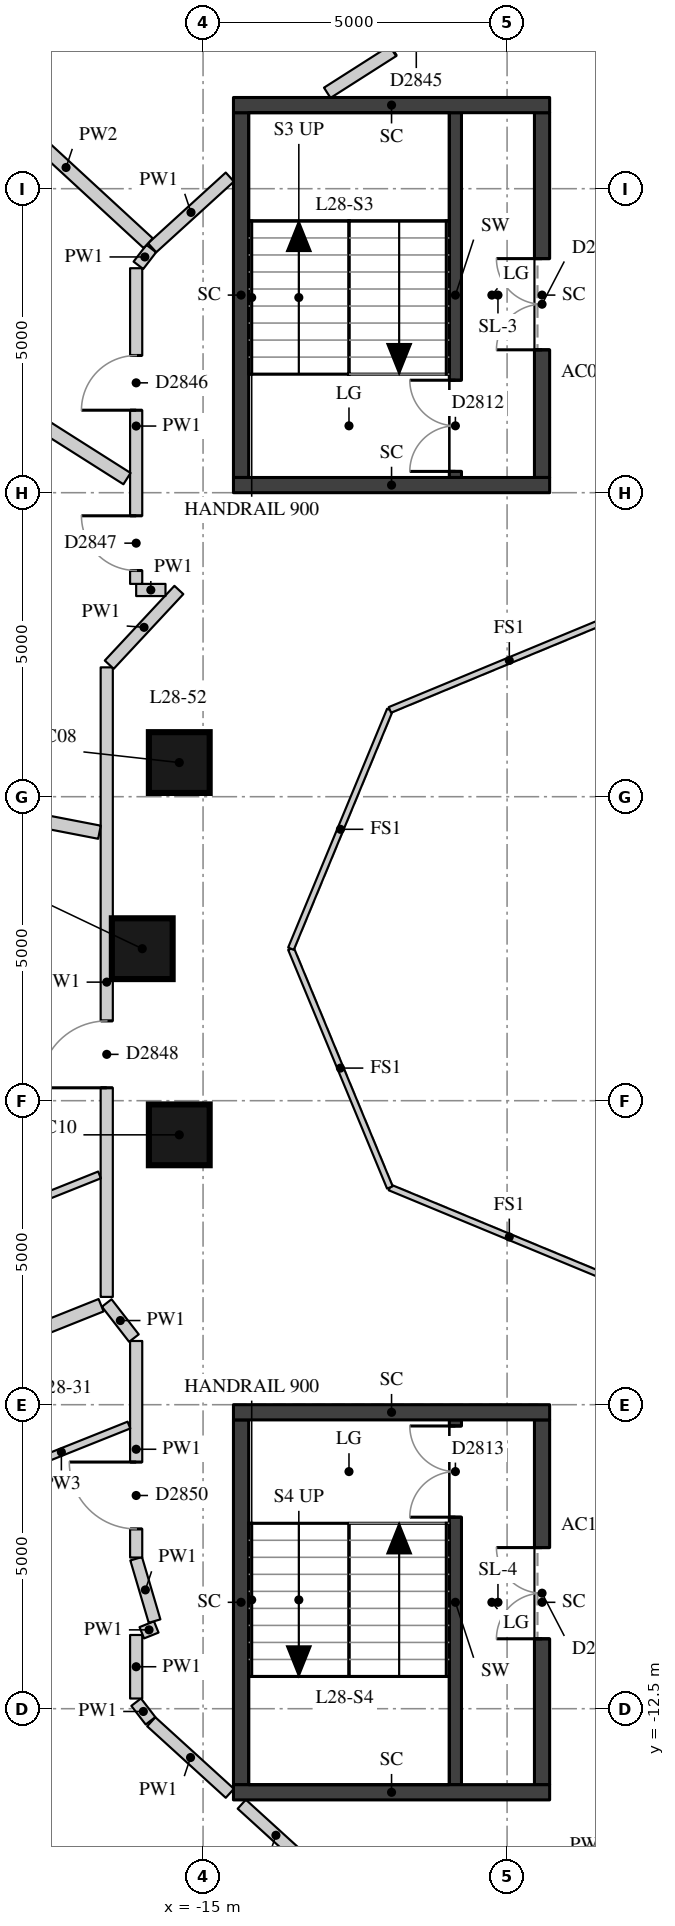
"""IFC4 building model, lengths in metres.
Left out: names, types, materials, properties, quantities, classifications, styles, units other than length and angle.
Written with IfcOpenShell. Run it as: python <this file> out.ifc"""

import sys

from ifc_helpers import new_model, si_unit, direction, frame, frame_2d, origin, origin_2d, place, context, subcontext, project, spatial, rectangle, extrude, element, fill, save


model = new_model("IFC4")
c1 = context("Model", 3, precision=1e-05, world=origin(), true_north=direction((0.0, 1.0)))
c2 = subcontext(c1, "Body", "Model", "MODEL_VIEW")
j1 = project(units=[si_unit("LENGTHUNIT", "METRE"), si_unit("PLANEANGLEUNIT", "RADIAN")], contexts=[c1])
p1 = place(None, origin())
s1 = spatial("IfcSite", under=j1, at=p1, CompositionType="ELEMENT")
p2 = place(p1, origin())
s2 = spatial("IfcBuilding", under=s1, at=p2, CompositionType="ELEMENT")
p3 = place(p2, frame((0.0, 0.0, 102.1)))
s3 = spatial("IfcBuildingStorey", under=s2, at=p3, CompositionType="ELEMENT", Elevation=102.1)
for number, where, z_axis, x_axis in (
    (1, (-15.391, 3.062, 0.0), (0.0, 0.0, 1.0), (1.0, 0.0, 0.0)),
    (2, (-16.0, 0.0, 0.0), (0.0, 0.0, 1.0), (1.0, 0.0, 0.0)),
    (3, (-15.391, -3.062, 0.0), (0.0, 0.0, 1.0), (1.0, 0.0, 0.0)),
):
    element("IfcColumn", number, at=place(p3, frame(where, z_axis=z_axis, x_axis=x_axis)), inside=s3, PredefinedType="COLUMN", context=c2, shape_type="SweptSolid", body=[
        extrude(rectangle(XDim=1.0, YDim=1.0, at=origin_2d()), origin(), (0.0, 0.0, 1.0), 3.3),
    ])
p4 = place(p3, frame((-10.85, 7.75, 0.0), z_axis=(0.0, 0.0, 1.0), x_axis=(0.0, 1.0, 0.0)))
e4 = element("IfcWall", 4, at=p4, inside=s3, PredefinedType="SHEAR", context=c2, shape_type="SweptSolid", body=[
    extrude(rectangle(XDim=6.0, YDim=0.2, at=frame_2d((3.0, 0.0))), origin(), (0.0, 0.0, 1.0), 3.02),
])
p5 = place(p4, frame((0.1, 0.0, 0.0)))
e5 = element("IfcOpeningElement", 5, at=p5, cuts=e4, PredefinedType="OPENING", context=c2, shape_type="SweptSolid", body=[
    extrude(rectangle(XDim=1.5, YDim=2.1, at=frame_2d((0.75, 1.05))), frame((0.0, 0.11, 0.0), z_axis=(0.0, -1.0, 0.0), x_axis=(1.0, 0.0, 0.0)), (0.0, 0.0, 1.0), 0.22),
])
p6 = place(p3, frame((-10.85, -13.75, 0.0), z_axis=(0.0, 0.0, 1.0), x_axis=(0.0, 1.0, 0.0)))
e6 = element("IfcWall", 6, at=p6, inside=s3, PredefinedType="SHEAR", context=c2, shape_type="SweptSolid", body=[
    extrude(rectangle(XDim=6.0, YDim=0.2, at=frame_2d((3.0, 0.0))), origin(), (0.0, 0.0, 1.0), 3.02),
])
p7 = place(p6, frame((4.4, 0.0, 0.0)))
e7 = element("IfcOpeningElement", 7, at=p7, cuts=e6, PredefinedType="OPENING", context=c2, shape_type="SweptSolid", body=[
    extrude(rectangle(XDim=1.5, YDim=2.1, at=frame_2d((0.75, 1.05))), frame((0.0, 0.11, 0.0), z_axis=(0.0, -1.0, 0.0), x_axis=(1.0, 0.0, 0.0)), (0.0, 0.0, 1.0), 0.22),
])
p8 = place(p3, frame((-14.375, 7.75, -0.28), z_axis=(0.0, 0.0, 1.0), x_axis=(0.0, 1.0, 0.0)))
e8 = element("IfcWall", 8, at=p8, inside=s3, PredefinedType="SHEAR", context=c2, shape_type="SweptSolid", body=[
    extrude(rectangle(XDim=6.0, YDim=0.25, at=frame_2d((3.0, 0.0))), origin(), (0.0, 0.0, 1.0), 3.3),
])
p9 = place(p3, frame((-9.425, 7.75, -0.28), z_axis=(0.0, 0.0, 1.0), x_axis=(0.0, 1.0, 0.0)))
e9 = element("IfcWall", 9, at=p9, inside=s3, PredefinedType="SHEAR", context=c2, shape_type="SweptSolid", body=[
    extrude(rectangle(XDim=6.0, YDim=0.25, at=frame_2d((3.0, 0.0))), origin(), (0.0, 0.0, 1.0), 3.3),
])
p10 = place(p9, frame((2.1, 0.0, 0.28)))
e10 = element("IfcOpeningElement", 10, at=p10, cuts=e9, PredefinedType="OPENING", context=c2, shape_type="SweptSolid", body=[
    extrude(rectangle(XDim=1.5, YDim=2.1, at=frame_2d((0.75, 1.05))), frame((0.0, 0.135, 0.0), z_axis=(0.0, -1.0, 0.0), x_axis=(1.0, 0.0, 0.0)), (0.0, 0.0, 1.0), 0.27),
])
for number, where, z_axis, x_axis in (
    (11, (-14.5, 13.875, -0.28), (0.0, 0.0, 1.0), (1.0, 0.0, 0.0)),
    (12, (-14.5, 7.625, -0.28), (0.0, 0.0, 1.0), (1.0, 0.0, 0.0)),
):
    element("IfcWall", number, at=place(p3, frame(where, z_axis=z_axis, x_axis=x_axis)), inside=s3, PredefinedType="SHEAR", context=c2, shape_type="SweptSolid", body=[
        extrude(rectangle(XDim=5.2, YDim=0.25, at=frame_2d((2.6, 0.0))), origin(), (0.0, 0.0, 1.0), 3.3),
    ])
p11 = place(p3, frame((-14.375, -13.75, -0.28), z_axis=(0.0, 0.0, 1.0), x_axis=(0.0, 1.0, 0.0)))
e13 = element("IfcWall", 13, at=p11, inside=s3, PredefinedType="SHEAR", context=c2, shape_type="SweptSolid", body=[
    extrude(rectangle(XDim=6.0, YDim=0.25, at=frame_2d((3.0, 0.0))), origin(), (0.0, 0.0, 1.0), 3.3),
])
p12 = place(p3, frame((-9.425, -13.75, -0.28), z_axis=(0.0, 0.0, 1.0), x_axis=(0.0, 1.0, 0.0)))
e14 = element("IfcWall", 14, at=p12, inside=s3, PredefinedType="SHEAR", context=c2, shape_type="SweptSolid", body=[
    extrude(rectangle(XDim=6.0, YDim=0.25, at=frame_2d((3.0, 0.0))), origin(), (0.0, 0.0, 1.0), 3.3),
])
p13 = place(p12, frame((2.4, 0.0, 0.28)))
e15 = element("IfcOpeningElement", 15, at=p13, cuts=e14, PredefinedType="OPENING", context=c2, shape_type="SweptSolid", body=[
    extrude(rectangle(XDim=1.5, YDim=2.1, at=frame_2d((0.75, 1.05))), frame((0.0, 0.135, 0.0), z_axis=(0.0, -1.0, 0.0), x_axis=(1.0, 0.0, 0.0)), (0.0, 0.0, 1.0), 0.27),
])
for number, where, z_axis, x_axis in (
    (16, (-14.5, -7.625, -0.28), (0.0, 0.0, 1.0), (1.0, 0.0, 0.0)),
    (17, (-14.5, -13.875, -0.28), (0.0, 0.0, 1.0), (1.0, 0.0, 0.0)),
):
    element("IfcWall", number, at=place(p3, frame(where, z_axis=z_axis, x_axis=x_axis)), inside=s3, PredefinedType="SHEAR", context=c2, shape_type="SweptSolid", body=[
        extrude(rectangle(XDim=5.2, YDim=0.25, at=frame_2d((2.6, 0.0))), origin(), (0.0, 0.0, 1.0), 3.3),
    ])
p14 = place(p3, frame((-14.56, -13.891, 0.0), z_axis=(0.0, 0.0, 1.0), x_axis=(-0.739440483737, 0.673221932954, 0.0)))
e18 = element("IfcWall", 18, at=p14, inside=s3, PredefinedType="PARTITIONING", context=c2, shape_type="SweptSolid", body=[
    extrude(rectangle(XDim=1.748, YDim=0.2, at=frame_2d((0.874, 0.0))), origin(), (0.0, 0.0, 1.0), 3.02),
])
p15 = place(p3, frame((-15.864, -12.699, 0.0), z_axis=(0.0, 0.0, 1.0), x_axis=(-0.61004607296, 0.792365943782, 0.0)))
e19 = element("IfcWall", 19, at=p15, inside=s3, PredefinedType="PARTITIONING", context=c2, shape_type="SweptSolid", body=[
    extrude(rectangle(XDim=0.387, YDim=0.2, at=frame_2d((0.193, 0.0))), origin(), (0.0, 0.0, 1.0), 3.02),
])
p16 = place(p3, frame((-16.1, -12.332, 0.0), z_axis=(0.0, 0.0, 1.0), x_axis=(0.0, 1.0, 0.0)))
e20 = element("IfcWall", 20, at=p16, inside=s3, PredefinedType="PARTITIONING", context=c2, shape_type="SweptSolid", body=[
    extrude(rectangle(XDim=1.045, YDim=0.2, at=frame_2d((0.522, 0.0))), origin(), (0.0, 0.0, 1.0), 3.02),
])
p17 = place(p3, frame((-16.007, -11.251, 0.0), z_axis=(0.0, 0.0, 1.0), x_axis=(0.928016011931, 0.372540308691, 0.0)))
e21 = element("IfcWall", 21, at=p17, inside=s3, PredefinedType="PARTITIONING", context=c2, shape_type="SweptSolid", body=[
    extrude(rectangle(XDim=0.256, YDim=0.2, at=frame_2d((0.128, 0.0))), origin(), (0.0, 0.0, 1.0), 3.02),
])
p18 = place(p3, frame((-15.798, -11.059, 0.0), z_axis=(0.0, 0.0, 1.0), x_axis=(-0.282883185669, 0.959154368841, 0.0)))
e22 = element("IfcWall", 22, at=p18, inside=s3, PredefinedType="PARTITIONING", context=c2, shape_type="SweptSolid", body=[
    extrude(rectangle(XDim=1.069, YDim=0.2, at=frame_2d((0.535, 0.0))), origin(), (0.0, 0.0, 1.0), 3.02),
])
p19 = place(p3, frame((-16.1, -10.013, 0.0), z_axis=(0.0, 0.0, 1.0), x_axis=(0.0, 1.0, 0.0)))
e23 = element("IfcWall", 23, at=p19, inside=s3, PredefinedType="PARTITIONING", context=c2, shape_type="SweptSolid", body=[
    extrude(rectangle(XDim=3.561, YDim=0.2, at=frame_2d((1.781, 0.0))), origin(), (0.0, 0.0, 1.0), 3.02),
])
p20 = place(p19, frame((0.47, 0.0, 0.0)))
e24 = element("IfcOpeningElement", 24, at=p20, cuts=e23, PredefinedType="OPENING", context=c2, shape_type="SweptSolid", body=[
    extrude(rectangle(XDim=1.1, YDim=2.1, at=frame_2d((0.55, 1.05))), frame((0.0, 0.11, 0.0), z_axis=(0.0, -1.0, 0.0), x_axis=(1.0, 0.0, 0.0)), (0.0, 0.0, 1.0), 0.22),
])
p21 = place(p3, frame((-16.137, -6.405, 0.0), z_axis=(0.0, 0.0, 1.0), x_axis=(-0.612388914667, 0.790556650211, 0.0)))
e25 = element("IfcWall", 25, at=p21, inside=s3, PredefinedType="PARTITIONING", context=c2, shape_type="SweptSolid", body=[
    extrude(rectangle(XDim=0.73, YDim=0.2, at=frame_2d((0.365, 0.0))), origin(), (0.0, 0.0, 1.0), 3.02),
])
p22 = place(p3, frame((-16.584, -5.727, 0.0), z_axis=(0.0, 0.0, 1.0), x_axis=(0.0, 1.0, 0.0)))
e26 = element("IfcWall", 26, at=p22, inside=s3, PredefinedType="PARTITIONING", context=c2, shape_type="SweptSolid", body=[
    extrude(rectangle(XDim=10.354, YDim=0.2, at=frame_2d((5.177, 0.0))), origin(), (0.0, 0.0, 1.0), 3.02),
])
p23 = place(p22, frame((3.439, 0.0, 0.0)))
e27 = element("IfcOpeningElement", 27, at=p23, cuts=e26, PredefinedType="OPENING", context=c2, shape_type="SweptSolid", body=[
    extrude(rectangle(XDim=1.1, YDim=2.1, at=frame_2d((0.55, 1.05))), frame((0.0, 0.11, 0.0), z_axis=(0.0, -1.0, 0.0), x_axis=(1.0, 0.0, 0.0)), (0.0, 0.0, 1.0), 0.22),
])
p24 = place(p3, frame((-16.543, 4.671, 0.0), z_axis=(0.0, 0.0, 1.0), x_axis=(0.681815766934, 0.731523929861, 0.0)))
e28 = element("IfcWall", 28, at=p24, inside=s3, PredefinedType="PARTITIONING", context=c2, shape_type="SweptSolid", body=[
    extrude(rectangle(XDim=1.68, YDim=0.2, at=frame_2d((0.84, 0.0))), origin(), (0.0, 0.0, 1.0), 3.02),
])
p25 = place(p3, frame((-15.618, 5.9, 0.0), z_axis=(0.0, 0.0, 1.0), x_axis=(-1.0, 0.0, 0.0)))
e29 = element("IfcWall", 29, at=p25, inside=s3, PredefinedType="PARTITIONING", context=c2, shape_type="SweptSolid", body=[
    extrude(rectangle(XDim=0.482, YDim=0.2, at=frame_2d((0.241, 0.0))), origin(), (0.0, 0.0, 1.0), 3.02),
])
p26 = place(p3, frame((-16.1, 6.0, 0.0), z_axis=(0.0, 0.0, 1.0), x_axis=(0.0, 1.0, 0.0)))
e30 = element("IfcWall", 30, at=p26, inside=s3, PredefinedType="PARTITIONING", context=c2, shape_type="SweptSolid", body=[
    extrude(rectangle(XDim=5.192, YDim=0.2, at=frame_2d((2.596, 0.0))), origin(), (0.0, 0.0, 1.0), 3.02),
])
p27 = place(p26, frame((2.857, 0.0, 0.0)))
e31 = element("IfcOpeningElement", 31, at=p27, cuts=e30, PredefinedType="OPENING", context=c2, shape_type="SweptSolid", body=[
    extrude(rectangle(XDim=0.9, YDim=2.1, at=frame_2d((0.45, 1.05))), frame((0.0, 0.11, 0.0), z_axis=(0.0, -1.0, 0.0), x_axis=(1.0, 0.0, 0.0)), (0.0, 0.0, 1.0), 0.22),
])
p28 = place(p26, frame((0.22, 0.0, 0.0)))
e32 = element("IfcOpeningElement", 32, at=p28, cuts=e30, PredefinedType="OPENING", context=c2, shape_type="SweptSolid", body=[
    extrude(rectangle(XDim=0.9, YDim=2.1, at=frame_2d((0.45, 1.05))), frame((0.0, 0.11, 0.0), z_axis=(0.0, -1.0, 0.0), x_axis=(1.0, 0.0, 0.0)), (0.0, 0.0, 1.0), 0.22),
])
p29 = place(p3, frame((-16.063, 11.24, 0.0), z_axis=(0.0, 0.0, 1.0), x_axis=(0.609744747854, 0.792597844096, 0.0)))
e33 = element("IfcWall", 33, at=p29, inside=s3, PredefinedType="PARTITIONING", context=c2, shape_type="SweptSolid", body=[
    extrude(rectangle(XDim=0.347, YDim=0.2, at=frame_2d((0.174, 0.0))), origin(), (0.0, 0.0, 1.0), 3.02),
])
p30 = place(p3, frame((-15.837, 11.528, 0.0), z_axis=(0.0, 0.0, 1.0), x_axis=(0.739402681643, 0.673263450946, 0.0)))
e34 = element("IfcWall", 34, at=p30, inside=s3, PredefinedType="PARTITIONING", context=c2, shape_type="SweptSolid", body=[
    extrude(rectangle(XDim=1.728, YDim=0.2, at=frame_2d((0.864, 0.0))), origin(), (0.0, 0.0, 1.0), 3.02),
])
p31 = place(p3, frame((-12.957, 14.077, 0.0), z_axis=(0.0, 0.0, 1.0), x_axis=(0.84319985174, 0.537600232538, 0.0)))
e35 = element("IfcWall", 35, at=p31, inside=s3, PredefinedType="PARTITIONING", context=c2, shape_type="SweptSolid", body=[
    extrude(rectangle(XDim=2.833, YDim=0.2, at=frame_2d((1.417, 0.0))), origin(), (0.0, 0.0, 1.0), 3.02),
])
p32 = place(p31, frame((1.286, 0.0, 0.0)))
e36 = element("IfcOpeningElement", 36, at=p32, cuts=e35, PredefinedType="OPENING", context=c2, shape_type="SweptSolid", body=[
    extrude(rectangle(XDim=0.9, YDim=2.1, at=frame_2d((0.45, 1.05))), frame((0.0, 0.11, 0.0), z_axis=(0.0, -1.0, 0.0), x_axis=(1.0, 0.0, 0.0)), (0.0, 0.0, 1.0), 0.22),
])
p33 = place(p3, frame((-13.24, -15.093, 0.0), z_axis=(0.0, 0.0, 1.0), x_axis=(-0.739438095557, 0.673224556028, 0.0)))
e37 = element("IfcWall", 37, at=p33, inside=s3, PredefinedType="PARTITIONING", context=c2, shape_type="SweptSolid", body=[
    extrude(rectangle(XDim=1.519, YDim=0.2, at=frame_2d((0.76, 0.0))), origin(), (0.0, 0.0, 1.0), 3.02),
])
p34 = place(p3, frame((-18.604, 14.094, 0.0), z_axis=(0.0, 0.0, 1.0), x_axis=(0.73529495628, -0.677747244383, 0.0)))
e38 = element("IfcWall", 38, at=p34, inside=s3, PredefinedType="PARTITIONING", context=c2, shape_type="SweptSolid", body=[
    extrude(rectangle(XDim=3.674, YDim=0.22, at=frame_2d((1.837, 0.0))), origin(), (0.0, 0.0, 1.0), 3.02),
])
p35 = place(p3, frame((-21.126, 10.823, 0.0), z_axis=(0.0, 0.0, 1.0), x_axis=(0.844518840625, -0.535525842355, 0.0)))
e39 = element("IfcWall", 39, at=p35, inside=s3, PredefinedType="PARTITIONING", context=c2, shape_type="SweptSolid", body=[
    extrude(rectangle(XDim=5.773, YDim=0.22, at=frame_2d((2.887, 0.0))), origin(), (0.0, 0.0, 1.0), 3.02),
])
p36 = place(p3, frame((-22.793, 3.095, 0.0), z_axis=(0.0, 0.0, 1.0), x_axis=(0.98175994641, -0.190124715976, 0.0)))
e40 = element("IfcWall", 40, at=p36, inside=s3, PredefinedType="PARTITIONING", context=c2, shape_type="SweptSolid", body=[
    extrude(rectangle(XDim=6.202, YDim=0.22, at=frame_2d((3.101, 0.0))), origin(), (0.0, 0.0, 1.0), 2.47),
])
p37 = place(p3, frame((-21.736, -7.887, 0.0), z_axis=(0.0, 0.0, 1.0), x_axis=(0.928513770625, 0.371297963583, 0.0)))
e41 = element("IfcWall", 41, at=p37, inside=s3, PredefinedType="PARTITIONING", context=c2, shape_type="SweptSolid", body=[
    extrude(rectangle(XDim=5.448, YDim=0.22, at=frame_2d((2.724, 0.0))), origin(), (0.0, 0.0, 1.0), 3.02),
])
p38 = place(p3, frame((-16.703, -3.721, 0.0), z_axis=(0.0, 0.0, 1.0), x_axis=(-0.928539725362, -0.371233051362, 0.0)))
e42 = element("IfcWall", 42, at=p38, inside=s3, PredefinedType="PARTITIONING", context=c2, shape_type="SweptSolid", body=[
    extrude(rectangle(XDim=3.472, YDim=0.12, at=frame_2d((1.736, 0.0))), origin(), (0.0, 0.0, 1.0), 3.02),
])
p39 = place(p3, frame((-16.219, -7.835, 0.0), z_axis=(0.0, 0.0, 1.0), x_axis=(-0.928532951542, -0.371249993806, 0.0)))
e43 = element("IfcWall", 43, at=p39, inside=s3, PredefinedType="PARTITIONING", context=c2, shape_type="SweptSolid", body=[
    extrude(rectangle(XDim=2.394, YDim=0.12, at=frame_2d((1.197, 0.0))), origin(), (0.0, 0.0, 1.0), 3.02),
])
p40 = place(p3, frame((-6.428, -14.352, 0.0), z_axis=(0.0, 0.0, 1.0), x_axis=(-0.46531034676, -0.885147604187, 0.0)))
e44 = element("IfcWall", 44, at=p40, inside=s3, PredefinedType="PARTITIONING", context=c2, shape_type="SweptSolid", body=[
    extrude(rectangle(XDim=5.261, YDim=0.12, at=frame_2d((2.631, 0.0))), origin(), (0.0, 0.0, 1.0), 3.02),
])
for number, where, z_axis, x_axis in (
    (45, (-8.0, -5.554, 0.0), (0.0, 0.0, 1.0), (-0.924, 0.383, 0.0)),
    (46, (-11.927, -3.927, 0.0), (0.0, 0.0, 1.0), (-0.383, 0.924, 0.0)),
    (47, (-13.554, 0.0, 0.0), (0.0, 0.0, 1.0), (0.383, 0.924, 0.0)),
    (48, (-11.927, 3.927, 0.0), (0.0, 0.0, 1.0), (0.924, 0.383, 0.0)),
):
    element("IfcWall", number, at=place(p3, frame(where, z_axis=z_axis, x_axis=x_axis)), inside=s3, PredefinedType="PARTITIONING", context=c2, shape_type="SweptSolid", body=[
        extrude(rectangle(XDim=4.251, YDim=0.1, at=frame_2d((2.125, 0.0))), origin(), (0.0, 0.0, 1.0), 3.02),
    ])
p41 = place(p5, origin())
e49 = element("IfcDoor", 49, at=p41, inside=s3, OperationType="DOUBLE_DOOR_SINGLE_SWING", PredefinedType="DOOR", context=c2, shape_type="SweptSolid", body=[
    extrude(rectangle(XDim=1.5, YDim=2.1, at=frame_2d((0.75, 1.05))), frame((0.0, 0.025, 0.0), z_axis=(0.0, -1.0, 0.0), x_axis=(1.0, 0.0, 0.0)), (0.0, 0.0, 1.0), 0.05),
])
fill(e5, e49)
p42 = place(p7, origin())
e50 = element("IfcDoor", 50, at=p42, inside=s3, OperationType="DOUBLE_DOOR_SINGLE_SWING", PredefinedType="DOOR", context=c2, shape_type="SweptSolid", body=[
    extrude(rectangle(XDim=1.5, YDim=2.1, at=frame_2d((0.75, 1.05))), frame((0.0, 0.025, 0.0), z_axis=(0.0, -1.0, 0.0), x_axis=(1.0, 0.0, 0.0)), (0.0, 0.0, 1.0), 0.05),
])
fill(e7, e50)
p43 = place(p10, origin())
e51 = element("IfcDoor", 51, at=p43, inside=s3, OperationType="DOUBLE_DOOR_SINGLE_SWING", PredefinedType="DOOR", context=c2, shape_type="SweptSolid", body=[
    extrude(rectangle(XDim=1.5, YDim=2.1, at=frame_2d((0.75, 1.05))), frame((0.0, 0.025, 0.0), z_axis=(0.0, -1.0, 0.0), x_axis=(1.0, 0.0, 0.0)), (0.0, 0.0, 1.0), 0.05),
])
fill(e10, e51)
p44 = place(p13, origin())
e52 = element("IfcDoor", 52, at=p44, inside=s3, OperationType="DOUBLE_DOOR_SINGLE_SWING", PredefinedType="DOOR", context=c2, shape_type="SweptSolid", body=[
    extrude(rectangle(XDim=1.5, YDim=2.1, at=frame_2d((0.75, 1.05))), frame((0.0, 0.025, 0.0), z_axis=(0.0, -1.0, 0.0), x_axis=(1.0, 0.0, 0.0)), (0.0, 0.0, 1.0), 0.05),
])
fill(e15, e52)
p45 = place(p32, origin())
e53 = element("IfcDoor", 53, at=p45, inside=s3, OperationType="SINGLE_SWING_RIGHT", PredefinedType="DOOR", context=c2, shape_type="SweptSolid", body=[
    extrude(rectangle(XDim=0.9, YDim=2.1, at=frame_2d((0.45, 1.05))), frame((0.0, 0.025, 0.0), z_axis=(0.0, -1.0, 0.0), x_axis=(1.0, 0.0, 0.0)), (0.0, 0.0, 1.0), 0.05),
])
fill(e36, e53)
p46 = place(p27, origin())
e54 = element("IfcDoor", 54, at=p46, inside=s3, OperationType="SINGLE_SWING_LEFT", PredefinedType="DOOR", context=c2, shape_type="SweptSolid", body=[
    extrude(rectangle(XDim=0.9, YDim=2.1, at=frame_2d((0.45, 1.05))), frame((0.0, 0.025, 0.0), z_axis=(0.0, -1.0, 0.0), x_axis=(1.0, 0.0, 0.0)), (0.0, 0.0, 1.0), 0.05),
])
fill(e31, e54)
p47 = place(p28, origin())
e55 = element("IfcDoor", 55, at=p47, inside=s3, OperationType="SINGLE_SWING_RIGHT", PredefinedType="DOOR", context=c2, shape_type="SweptSolid", body=[
    extrude(rectangle(XDim=0.9, YDim=2.1, at=frame_2d((0.45, 1.05))), frame((0.0, 0.025, 0.0), z_axis=(0.0, -1.0, 0.0), x_axis=(1.0, 0.0, 0.0)), (0.0, 0.0, 1.0), 0.05),
])
fill(e32, e55)
p48 = place(p23, origin())
e56 = element("IfcDoor", 56, at=p48, inside=s3, OperationType="SINGLE_SWING_LEFT", PredefinedType="DOOR", context=c2, shape_type="SweptSolid", body=[
    extrude(rectangle(XDim=1.1, YDim=2.1, at=frame_2d((0.55, 1.05))), frame((0.0, 0.025, 0.0), z_axis=(0.0, -1.0, 0.0), x_axis=(1.0, 0.0, 0.0)), (0.0, 0.0, 1.0), 0.05),
])
fill(e27, e56)
p49 = place(p20, origin())
e57 = element("IfcDoor", 57, at=p49, inside=s3, OperationType="SINGLE_SWING_RIGHT", PredefinedType="DOOR", context=c2, shape_type="SweptSolid", body=[
    extrude(rectangle(XDim=1.1, YDim=2.1, at=frame_2d((0.55, 1.05))), frame((0.0, 0.025, 0.0), z_axis=(0.0, -1.0, 0.0), x_axis=(1.0, 0.0, 0.0)), (0.0, 0.0, 1.0), 0.05),
])
fill(e24, e57)
save(model, sys.argv[1])
